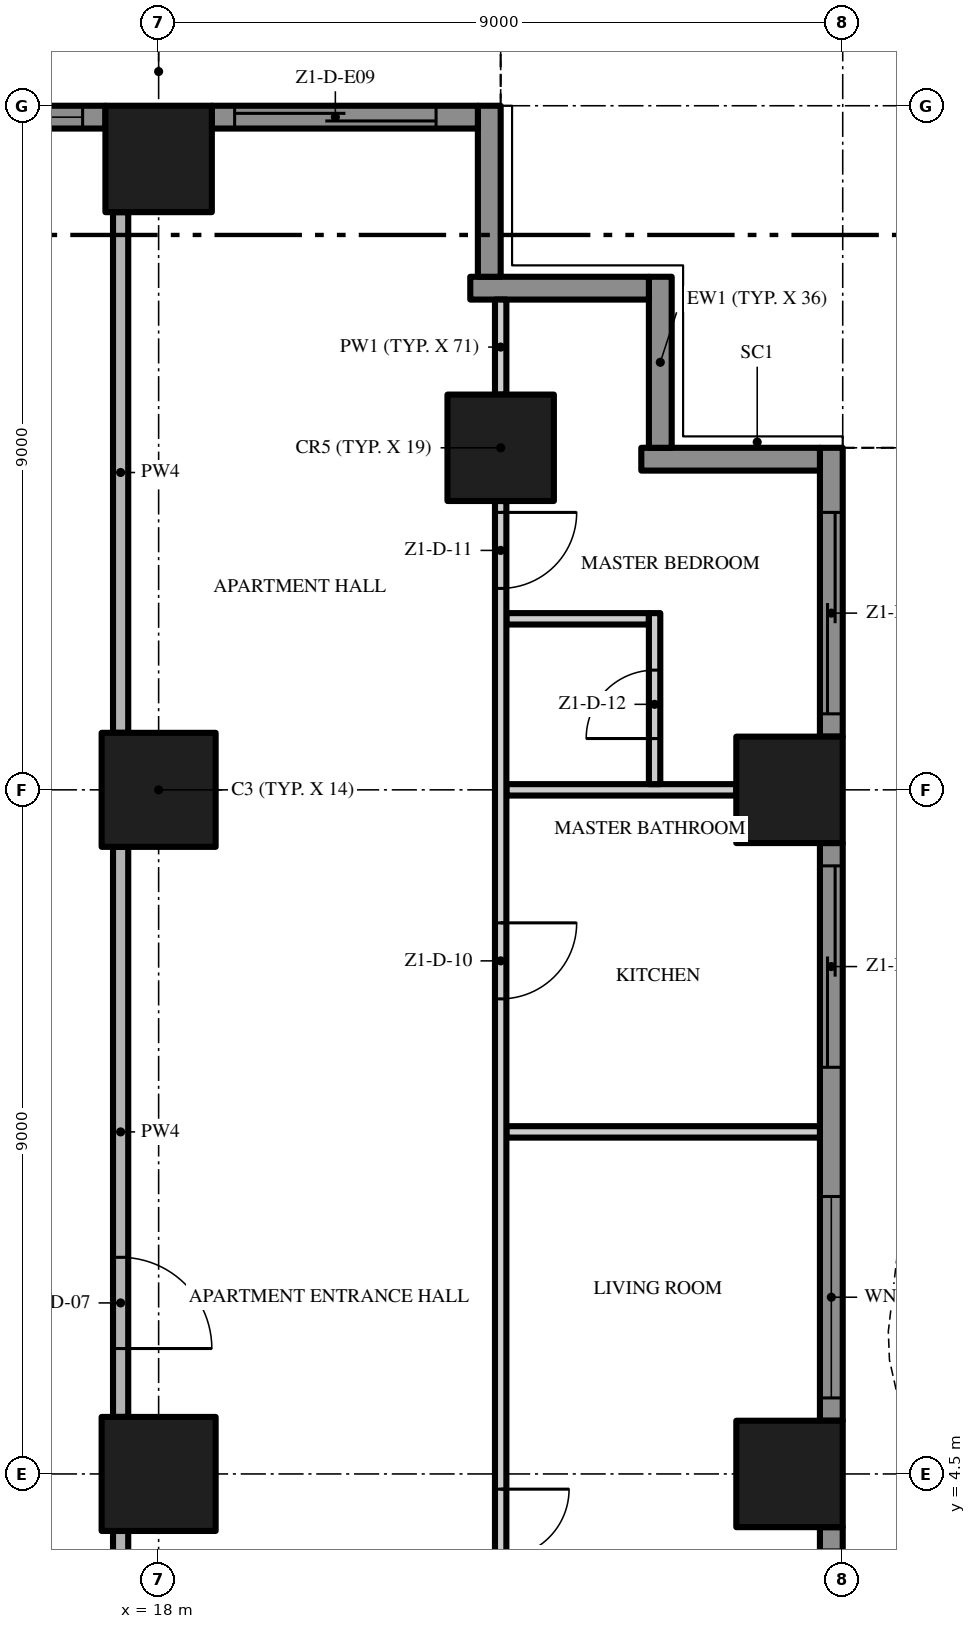
"""IFC4 building model, lengths in metres.
Left out: names, types, materials, properties, quantities, classifications, styles, units other than length and angle.
Written with IfcOpenShell. Run it as: python <this file> out.ifc"""

import sys

from ifc_helpers import new_model, si_unit, direction, frame, frame_2d, origin, origin_2d, place, context, subcontext, project, spatial, polyline, rectangle, outline, extrude, element, fill, save


model = new_model("IFC4")
c1 = context("Model", 3, precision=1e-05, world=origin(), true_north=direction((0.0, 1.0)))
c2 = subcontext(c1, "Body", "Model", "MODEL_VIEW")
j1 = project(units=[si_unit("LENGTHUNIT", "METRE"), si_unit("PLANEANGLEUNIT", "RADIAN")], contexts=[c1])
p1 = place(None, origin())
s1 = spatial("IfcSite", under=j1, at=p1, CompositionType="ELEMENT")
p2 = place(p1, origin())
s2 = spatial("IfcBuilding", under=s1, at=p2, CompositionType="ELEMENT")
p3 = place(p2, frame((0.0, 0.0, 49.2)))
s3 = spatial("IfcBuildingStorey", under=s2, at=p3, CompositionType="ELEMENT", Elevation=49.2)
p4 = place(p3, frame((18.0, 13.5, 0.0), z_axis=(0.0, 0.0, 1.0), x_axis=(1.0, 0.0, 0.0)))
e1 = element("IfcColumn", 1, at=p4, inside=s3, PredefinedType="COLUMN", context=c2, shape_type="SweptSolid", body=[
    extrude(rectangle(XDim=1.5, YDim=1.5, at=origin_2d()), origin(), (0.0, 0.0, 1.0), 3.5),
])
p5 = place(p3, frame((18.0, 21.8, 0.0), z_axis=(0.0, 0.0, 1.0), x_axis=(1.0, 0.0, 0.0)))
e2 = element("IfcColumn", 2, at=p5, inside=s3, PredefinedType="COLUMN", context=c2, shape_type="SweptSolid", body=[
    extrude(rectangle(XDim=1.4, YDim=1.4, at=origin_2d()), origin(), (0.0, 0.0, 1.0), 3.5),
])
p6 = place(p3, frame((18.0, 4.5, 0.0), z_axis=(0.0, 0.0, 1.0), x_axis=(1.0, 0.0, 0.0)))
e3 = element("IfcColumn", 3, at=p6, inside=s3, PredefinedType="COLUMN", context=c2, shape_type="SweptSolid", body=[
    extrude(rectangle(XDim=1.5, YDim=1.5, at=origin_2d()), origin(), (0.0, 0.0, 1.0), 3.5),
])
for number, where, z_axis, x_axis in (
    (4, (26.3, 13.5, 0.0), (0.0, 0.0, 1.0), (1.0, 0.0, 0.0)),
    (5, (22.5, 18.0, 0.0), (0.0, 0.0, 1.0), (1.0, 0.0, 0.0)),
    (6, (26.3, 4.5, 0.0), (0.0, 0.0, 1.0), (1.0, 0.0, 0.0)),
):
    element("IfcColumn", number, at=place(p3, frame(where, z_axis=z_axis, x_axis=x_axis)), inside=s3, PredefinedType="COLUMN", context=c2, shape_type="SweptSolid", body=[
        extrude(rectangle(XDim=1.4, YDim=1.4, at=origin_2d()), origin(), (0.0, 0.0, 1.0), 3.5),
    ])
p7 = place(p3, frame((26.85, 3.8, 0.0), z_axis=(0.0, 0.0, 1.0), x_axis=(0.0, -1.0, 0.0)))
e7 = element("IfcWall", 7, at=p7, inside=s3, PredefinedType="SOLIDWALL", context=c2, shape_type="SweptSolid", body=[
    extrude(rectangle(XDim=7.6, YDim=0.3, at=frame_2d((3.8, 0.0))), origin(), (0.0, 0.0, 1.0), 3.5),
])
p8 = place(p7, frame((4.65, 0.0, 0.0)))
e8 = element("IfcOpeningElement", 8, at=p8, cuts=e7, PredefinedType="OPENING", context=c2, shape_type="SweptSolid", body=[
    extrude(rectangle(XDim=2.65, YDim=2.4, at=frame_2d((1.325, 1.2))), frame((0.0, 0.16, 0.0), z_axis=(0.0, -1.0, 0.0), x_axis=(1.0, 0.0, 0.0)), (0.0, 0.0, 1.0), 0.32),
])
p9 = place(p7, frame((0.3, 0.0, 0.45)))
e9 = element("IfcOpeningElement", 9, at=p9, cuts=e7, PredefinedType="OPENING", context=c2, shape_type="SweptSolid", body=[
    extrude(rectangle(XDim=2.65, YDim=2.65, at=frame_2d((1.325, 1.325))), frame((0.0, 0.16, 0.0), z_axis=(0.0, -1.0, 0.0), x_axis=(1.0, 0.0, 0.0)), (0.0, 0.0, 1.0), 0.32),
])
p10 = place(p3, frame((26.85, 12.8, 0.0), z_axis=(0.0, 0.0, 1.0), x_axis=(0.0, -1.0, 0.0)))
e10 = element("IfcWall", 10, at=p10, inside=s3, PredefinedType="SOLIDWALL", context=c2, shape_type="SweptSolid", body=[
    extrude(rectangle(XDim=7.6, YDim=0.3, at=frame_2d((3.8, 0.0))), origin(), (0.0, 0.0, 1.0), 3.5),
])
p11 = place(p10, frame((4.65, 0.0, 0.45)))
e11 = element("IfcOpeningElement", 11, at=p11, cuts=e10, PredefinedType="OPENING", context=c2, shape_type="SweptSolid", body=[
    extrude(rectangle(XDim=2.65, YDim=2.65, at=frame_2d((1.325, 1.325))), frame((0.0, 0.16, 0.0), z_axis=(0.0, -1.0, 0.0), x_axis=(1.0, 0.0, 0.0)), (0.0, 0.0, 1.0), 0.32),
])
p12 = place(p10, frame((0.3, 0.0, 0.0)))
e12 = element("IfcOpeningElement", 12, at=p12, cuts=e10, PredefinedType="OPENING", context=c2, shape_type="SweptSolid", body=[
    extrude(rectangle(XDim=2.65, YDim=2.4, at=frame_2d((1.325, 1.2))), frame((0.0, 0.16, 0.0), z_axis=(0.0, -1.0, 0.0), x_axis=(1.0, 0.0, 0.0)), (0.0, 0.0, 1.0), 0.32),
])
p13 = place(p3, frame((26.85, 18.0, 0.0), z_axis=(0.0, 0.0, 1.0), x_axis=(0.0, -1.0, 0.0)))
e13 = element("IfcWall", 13, at=p13, inside=s3, PredefinedType="SOLIDWALL", context=c2, shape_type="SweptSolid", body=[
    extrude(rectangle(XDim=3.8, YDim=0.3, at=frame_2d((1.9, 0.0))), origin(), (0.0, 0.0, 1.0), 3.5),
])
p14 = place(p13, frame((0.85, 0.0, 0.0)))
e14 = element("IfcOpeningElement", 14, at=p14, cuts=e13, PredefinedType="OPENING", context=c2, shape_type="SweptSolid", body=[
    extrude(rectangle(XDim=2.65, YDim=2.4, at=frame_2d((1.325, 1.2))), frame((0.0, 0.16, 0.0), z_axis=(0.0, -1.0, 0.0), x_axis=(1.0, 0.0, 0.0)), (0.0, 0.0, 1.0), 0.32),
])
p15 = place(p3, frame((24.35, 17.85, 0.0), z_axis=(0.0, 0.0, 1.0), x_axis=(1.0, 0.0, 0.0)))
e15 = element("IfcWall", 15, at=p15, inside=s3, PredefinedType="SOLIDWALL", context=c2, shape_type="SweptSolid", body=[
    extrude(rectangle(XDim=2.35, YDim=0.3, at=frame_2d((1.175, 0.0))), origin(), (0.0, 0.0, 1.0), 3.5),
])
p16 = place(p3, frame((24.6, 20.25, 0.0), z_axis=(0.0, 0.0, 1.0), x_axis=(0.0, -1.0, 0.0)))
e16 = element("IfcWall", 16, at=p16, inside=s3, PredefinedType="SOLIDWALL", context=c2, shape_type="SweptSolid", body=[
    extrude(rectangle(XDim=2.25, YDim=0.3, at=frame_2d((1.125, 0.0))), origin(), (0.0, 0.0, 1.0), 3.5),
])
p17 = place(p3, frame((22.1, 20.1, 0.0), z_axis=(0.0, 0.0, 1.0), x_axis=(1.0, 0.0, 0.0)))
e17 = element("IfcWall", 17, at=p17, inside=s3, PredefinedType="SOLIDWALL", context=c2, shape_type="SweptSolid", body=[
    extrude(rectangle(XDim=2.35, YDim=0.3, at=frame_2d((1.175, 0.0))), origin(), (0.0, 0.0, 1.0), 3.5),
])
p18 = place(p3, frame((22.35, 22.5, 0.0), z_axis=(0.0, 0.0, 1.0), x_axis=(0.0, -1.0, 0.0)))
e18 = element("IfcWall", 18, at=p18, inside=s3, PredefinedType="SOLIDWALL", context=c2, shape_type="SweptSolid", body=[
    extrude(rectangle(XDim=2.25, YDim=0.3, at=frame_2d((1.125, 0.0))), origin(), (0.0, 0.0, 1.0), 3.5),
])
p19 = place(p3, frame((18.7, 22.35, 0.0), z_axis=(0.0, 0.0, 1.0), x_axis=(1.0, 0.0, 0.0)))
e19 = element("IfcWall", 19, at=p19, inside=s3, PredefinedType="SOLIDWALL", context=c2, shape_type="SweptSolid", body=[
    extrude(rectangle(XDim=3.5, YDim=0.3, at=frame_2d((1.75, 0.0))), origin(), (0.0, 0.0, 1.0), 3.5),
])
p20 = place(p19, frame((0.3, 0.0, 0.0)))
e20 = element("IfcOpeningElement", 20, at=p20, cuts=e19, PredefinedType="OPENING", context=c2, shape_type="SweptSolid", body=[
    extrude(rectangle(XDim=2.65, YDim=2.4, at=frame_2d((1.325, 1.2))), frame((0.0, 0.16, 0.0), z_axis=(0.0, -1.0, 0.0), x_axis=(1.0, 0.0, 0.0)), (0.0, 0.0, 1.0), 0.32),
])
p21 = place(p3, frame((13.5, 22.35, 0.0), z_axis=(0.0, 0.0, 1.0), x_axis=(1.0, 0.0, 0.0)))
e21 = element("IfcWall", 21, at=p21, inside=s3, PredefinedType="SOLIDWALL", context=c2, shape_type="SweptSolid", body=[
    extrude(rectangle(XDim=3.8, YDim=0.3, at=frame_2d((1.9, 0.0))), origin(), (0.0, 0.0, 1.0), 3.5),
])
p22 = place(p21, frame((0.85, 0.0, 0.45)))
e22 = element("IfcOpeningElement", 22, at=p22, cuts=e21, PredefinedType="OPENING", context=c2, shape_type="SweptSolid", body=[
    extrude(rectangle(XDim=2.65, YDim=2.65, at=frame_2d((1.325, 1.325))), frame((0.0, 0.16, 0.0), z_axis=(0.0, -1.0, 0.0), x_axis=(1.0, 0.0, 0.0)), (0.0, 0.0, 1.0), 0.32),
])
p23 = place(p3, origin())
e23 = element("IfcWall", 23, at=p23, inside=s3, PredefinedType="USERDEFINED", context=c2, shape_type="SweptSolid", body=[
    extrude(outline(polyline([(29.649, -18.0), (29.985, -16.5), (30.0, -16.125), (29.869, -15.0), (29.345, -13.5), (28.612, -12.0), (27.951, -10.5), (27.615, -9.0), (27.6, -8.625), (27.731, -7.5), (28.255, -6.0), (28.988, -4.5), (29.649, -3.0), (29.985, -1.5), (30.0, -1.125), (29.869, 0.0), (29.345, 1.5), (28.612, 3.0), (27.951, 4.5), (27.615, 6.0), (27.6, 6.375), (27.731, 7.5), (28.255, 9.0), (28.988, 10.5), (29.649, 12.0), (29.985, 13.5), (30.0, 13.875), (29.869, 15.0), (29.345, 16.5), (28.612, 18.0), (28.388, 17.89), (29.114, 16.404), (29.624, 14.944), (29.749, 13.865), (29.736, 13.533), (29.41, 12.079), (28.761, 10.605), (28.024, 9.096), (27.486, 7.556), (27.349, 6.385), (27.366, 5.967), (27.713, 4.421), (28.385, 2.895), (29.114, 1.404), (29.624, -0.056), (29.749, -1.135), (29.736, -1.467), (29.41, -2.921), (28.761, -4.395), (28.024, -5.904), (27.486, -7.444), (27.349, -8.615), (27.366, -9.033), (27.713, -10.579), (28.385, -12.105), (29.114, -13.596), (29.624, -15.056), (29.749, -16.135), (29.736, -16.467), (29.405, -17.945), (29.649, -18.0)])), origin(), (0.0, 0.0, 1.0), 0.9),
])
p24 = place(p3, origin())
e24 = element("IfcWall", 24, at=p24, inside=s3, PredefinedType="USERDEFINED", context=c2, shape_type="SweptSolid", body=[
    extrude(outline(polyline([(22.5, 25.149), (21.0, 25.485), (20.625, 25.5), (19.5, 25.369), (18.0, 24.845), (16.5, 24.112), (15.0, 23.451), (13.5, 23.115), (13.555, 22.871), (15.079, 23.213), (16.605, 23.885), (18.096, 24.614), (19.556, 25.124), (20.635, 25.249), (20.967, 25.236), (22.445, 24.905), (22.5, 25.149)])), origin(), (0.0, 0.0, 1.0), 0.9),
])
p25 = place(p3, frame((22.575, 9.0, 0.0), z_axis=(0.0, 0.0, 1.0), x_axis=(1.0, 0.0, 0.0)))
e25 = element("IfcWall", 25, at=p25, inside=s3, PredefinedType="PARTITIONING", context=c2, shape_type="SweptSolid", body=[
    extrude(rectangle(XDim=4.125, YDim=0.15, at=frame_2d((2.062, 0.0))), origin(), (0.0, 0.0, 1.0), 3.5),
])
p26 = place(p3, frame((22.575, 13.5, 0.0), z_axis=(0.0, 0.0, 1.0), x_axis=(1.0, 0.0, 0.0)))
e26 = element("IfcWall", 26, at=p26, inside=s3, PredefinedType="PARTITIONING", context=c2, shape_type="SweptSolid", body=[
    extrude(rectangle(XDim=3.025, YDim=0.15, at=frame_2d((1.512, 0.0))), origin(), (0.0, 0.0, 1.0), 3.5),
])
p27 = place(p3, frame((22.575, 15.75, 0.0), z_axis=(0.0, 0.0, 1.0), x_axis=(1.0, 0.0, 0.0)))
e27 = element("IfcWall", 27, at=p27, inside=s3, PredefinedType="PARTITIONING", context=c2, shape_type="SweptSolid", body=[
    extrude(rectangle(XDim=1.875, YDim=0.15, at=frame_2d((0.938, 0.0))), origin(), (0.0, 0.0, 1.0), 3.5),
])
p28 = place(p3, frame((17.5, -0.2, 0.0), z_axis=(0.0, 0.0, 1.0), x_axis=(0.0, 1.0, 0.0)))
e28 = element("IfcWall", 28, at=p28, inside=s3, PredefinedType="PARTITIONING", context=c2, shape_type="SweptSolid", body=[
    extrude(rectangle(XDim=3.95, YDim=0.2, at=frame_2d((1.975, 0.0))), origin(), (0.0, 0.0, 1.0), 3.5),
])
p29 = place(p3, frame((17.5, 12.75, 0.0), z_axis=(0.0, 0.0, 1.0), x_axis=(0.0, -1.0, 0.0)))
e29 = element("IfcWall", 29, at=p29, inside=s3, PredefinedType="PARTITIONING", context=c2, shape_type="SweptSolid", body=[
    extrude(rectangle(XDim=7.5, YDim=0.2, at=frame_2d((3.75, 0.0))), origin(), (0.0, 0.0, 1.0), 3.5),
])
p30 = place(p29, frame((5.4, 0.0, 0.0)))
e30 = element("IfcOpeningElement", 30, at=p30, cuts=e29, PredefinedType="OPENING", context=c2, shape_type="SweptSolid", body=[
    extrude(rectangle(XDim=1.2, YDim=2.4, at=frame_2d((0.6, 1.2))), frame((0.0, 0.11, 0.0), z_axis=(0.0, -1.0, 0.0), x_axis=(1.0, 0.0, 0.0)), (0.0, 0.0, 1.0), 0.22),
])
p31 = place(p3, frame((17.5, 14.25, 0.0), z_axis=(0.0, 0.0, 1.0), x_axis=(0.0, 1.0, 0.0)))
e31 = element("IfcWall", 31, at=p31, inside=s3, PredefinedType="PARTITIONING", context=c2, shape_type="SweptSolid", body=[
    extrude(rectangle(XDim=6.85, YDim=0.2, at=frame_2d((3.425, 0.0))), origin(), (0.0, 0.0, 1.0), 3.5),
])
p32 = place(p3, frame((22.5, 17.3, 0.0), z_axis=(0.0, 0.0, 1.0), x_axis=(0.0, -1.0, 0.0)))
e32 = element("IfcWall", 32, at=p32, inside=s3, PredefinedType="PARTITIONING", context=c2, shape_type="SweptSolid", body=[
    extrude(rectangle(XDim=17.2, YDim=0.15, at=frame_2d((8.6, 0.0))), origin(), (0.0, 0.0, 1.0), 3.5),
])
p33 = place(p32, frame((13.0, 0.0, 0.0)))
e33 = element("IfcOpeningElement", 33, at=p33, cuts=e32, PredefinedType="OPENING", context=c2, shape_type="SweptSolid", body=[
    extrude(rectangle(XDim=1.8, YDim=2.4, at=frame_2d((0.9, 1.2))), frame((0.0, 0.085, 0.0), z_axis=(0.0, -1.0, 0.0), x_axis=(1.0, 0.0, 0.0)), (0.0, 0.0, 1.0), 0.17),
])
p34 = place(p32, frame((5.55, 0.0, 0.0)))
e34 = element("IfcOpeningElement", 34, at=p34, cuts=e32, PredefinedType="OPENING", context=c2, shape_type="SweptSolid", body=[
    extrude(rectangle(XDim=1.0, YDim=2.4, at=frame_2d((0.5, 1.2))), frame((0.0, 0.085, 0.0), z_axis=(0.0, -1.0, 0.0), x_axis=(1.0, 0.0, 0.0)), (0.0, 0.0, 1.0), 0.17),
])
p35 = place(p32, frame((0.15, 0.0, 0.0)))
e35 = element("IfcOpeningElement", 35, at=p35, cuts=e32, PredefinedType="OPENING", context=c2, shape_type="SweptSolid", body=[
    extrude(rectangle(XDim=1.0, YDim=2.4, at=frame_2d((0.5, 1.2))), frame((0.0, 0.085, 0.0), z_axis=(0.0, -1.0, 0.0), x_axis=(1.0, 0.0, 0.0)), (0.0, 0.0, 1.0), 0.17),
])
p36 = place(p3, frame((22.5, 18.7, 0.0), z_axis=(0.0, 0.0, 1.0), x_axis=(0.0, 1.0, 0.0)))
e36 = element("IfcWall", 36, at=p36, inside=s3, PredefinedType="PARTITIONING", context=c2, shape_type="SweptSolid", body=[
    extrude(rectangle(XDim=1.25, YDim=0.15, at=frame_2d((0.625, 0.0))), origin(), (0.0, 0.0, 1.0), 3.5),
])
p37 = place(p3, frame((24.525, 13.575, 0.0), z_axis=(0.0, 0.0, 1.0), x_axis=(0.0, 1.0, 0.0)))
e37 = element("IfcWall", 37, at=p37, inside=s3, PredefinedType="PARTITIONING", context=c2, shape_type="SweptSolid", body=[
    extrude(rectangle(XDim=2.25, YDim=0.15, at=frame_2d((1.125, 0.0))), origin(), (0.0, 0.0, 1.0), 3.5),
])
p38 = place(p37, frame((0.6, 0.0, 0.0)))
e38 = element("IfcOpeningElement", 38, at=p38, cuts=e37, PredefinedType="OPENING", context=c2, shape_type="SweptSolid", body=[
    extrude(rectangle(XDim=0.9, YDim=2.1, at=frame_2d((0.45, 1.05))), frame((0.0, 0.085, 0.0), z_axis=(0.0, -1.0, 0.0), x_axis=(1.0, 0.0, 0.0)), (0.0, 0.0, 1.0), 0.17),
])
p39 = place(p11, origin())
e39 = element("IfcWindow", 39, at=p39, inside=s3, PartitioningType="SINGLE_PANEL", PredefinedType="WINDOW", context=c2, shape_type="SweptSolid", body=[
    extrude(rectangle(XDim=2.65, YDim=2.65, at=frame_2d((1.325, 1.325))), frame((0.0, 0.03, 0.0), z_axis=(0.0, -1.0, 0.0), x_axis=(1.0, 0.0, 0.0)), (0.0, 0.0, 1.0), 0.06),
])
fill(e11, e39)
p40 = place(p12, origin())
e40 = element("IfcDoor", 40, at=p40, inside=s3, OperationType="SINGLE_SWING_LEFT", PredefinedType="DOOR", context=c2, shape_type="SweptSolid", body=[
    extrude(rectangle(XDim=2.65, YDim=2.4, at=frame_2d((1.325, 1.2))), frame((0.0, 0.025, 0.0), z_axis=(0.0, -1.0, 0.0), x_axis=(1.0, 0.0, 0.0)), (0.0, 0.0, 1.0), 0.05),
])
fill(e12, e40)
p41 = place(p14, origin())
e41 = element("IfcDoor", 41, at=p41, inside=s3, OperationType="SINGLE_SWING_LEFT", PredefinedType="DOOR", context=c2, shape_type="SweptSolid", body=[
    extrude(rectangle(XDim=2.65, YDim=2.4, at=frame_2d((1.325, 1.2))), frame((0.0, 0.025, 0.0), z_axis=(0.0, -1.0, 0.0), x_axis=(1.0, 0.0, 0.0)), (0.0, 0.0, 1.0), 0.05),
])
fill(e14, e41)
p42 = place(p20, origin())
e42 = element("IfcDoor", 42, at=p42, inside=s3, OperationType="SINGLE_SWING_LEFT", PredefinedType="DOOR", context=c2, shape_type="SweptSolid", body=[
    extrude(rectangle(XDim=2.65, YDim=2.4, at=frame_2d((1.325, 1.2))), frame((0.0, 0.025, 0.0), z_axis=(0.0, -1.0, 0.0), x_axis=(1.0, 0.0, 0.0)), (0.0, 0.0, 1.0), 0.05),
])
fill(e20, e42)
p43 = place(p22, origin())
e43 = element("IfcWindow", 43, at=p43, inside=s3, PartitioningType="SINGLE_PANEL", PredefinedType="WINDOW", context=c2, shape_type="SweptSolid", body=[
    extrude(rectangle(XDim=2.65, YDim=2.65, at=frame_2d((1.325, 1.325))), frame((0.0, 0.03, 0.0), z_axis=(0.0, -1.0, 0.0), x_axis=(1.0, 0.0, 0.0)), (0.0, 0.0, 1.0), 0.06),
])
fill(e22, e43)
p44 = place(p30, origin())
e44 = element("IfcDoor", 44, at=p44, inside=s3, OperationType="SINGLE_SWING_RIGHT", PredefinedType="DOOR", context=c2, shape_type="SweptSolid", body=[
    extrude(rectangle(XDim=1.2, YDim=2.4, at=frame_2d((0.6, 1.2))), frame((0.0, 0.025, 0.0), z_axis=(0.0, -1.0, 0.0), x_axis=(1.0, 0.0, 0.0)), (0.0, 0.0, 1.0), 0.05),
])
fill(e30, e44)
p45 = place(p33, origin())
e45 = element("IfcDoor", 45, at=p45, inside=s3, OperationType="DOUBLE_DOOR_SINGLE_SWING", PredefinedType="DOOR", context=c2, shape_type="SweptSolid", body=[
    extrude(rectangle(XDim=1.8, YDim=2.4, at=frame_2d((0.9, 1.2))), frame((0.0, 0.025, 0.0), z_axis=(0.0, -1.0, 0.0), x_axis=(1.0, 0.0, 0.0)), (0.0, 0.0, 1.0), 0.05),
])
fill(e33, e45)
p46 = place(p34, origin())
e46 = element("IfcDoor", 46, at=p46, inside=s3, OperationType="SINGLE_SWING_LEFT", PredefinedType="DOOR", context=c2, shape_type="SweptSolid", body=[
    extrude(rectangle(XDim=1.0, YDim=2.4, at=frame_2d((0.5, 1.2))), frame((0.0, 0.025, 0.0), z_axis=(0.0, -1.0, 0.0), x_axis=(1.0, 0.0, 0.0)), (0.0, 0.0, 1.0), 0.05),
])
fill(e34, e46)
p47 = place(p35, origin())
e47 = element("IfcDoor", 47, at=p47, inside=s3, OperationType="SINGLE_SWING_LEFT", PredefinedType="DOOR", context=c2, shape_type="SweptSolid", body=[
    extrude(rectangle(XDim=1.0, YDim=2.4, at=frame_2d((0.5, 1.2))), frame((0.0, 0.025, 0.0), z_axis=(0.0, -1.0, 0.0), x_axis=(1.0, 0.0, 0.0)), (0.0, 0.0, 1.0), 0.05),
])
fill(e35, e47)
p48 = place(p38, origin())
e48 = element("IfcDoor", 48, at=p48, inside=s3, OperationType="SINGLE_SWING_LEFT", PredefinedType="DOOR", context=c2, shape_type="SweptSolid", body=[
    extrude(rectangle(XDim=0.9, YDim=2.1, at=frame_2d((0.45, 1.05))), frame((0.0, 0.025, 0.0), z_axis=(0.0, -1.0, 0.0), x_axis=(1.0, 0.0, 0.0)), (0.0, 0.0, 1.0), 0.05),
])
fill(e38, e48)
save(model, sys.argv[1])
